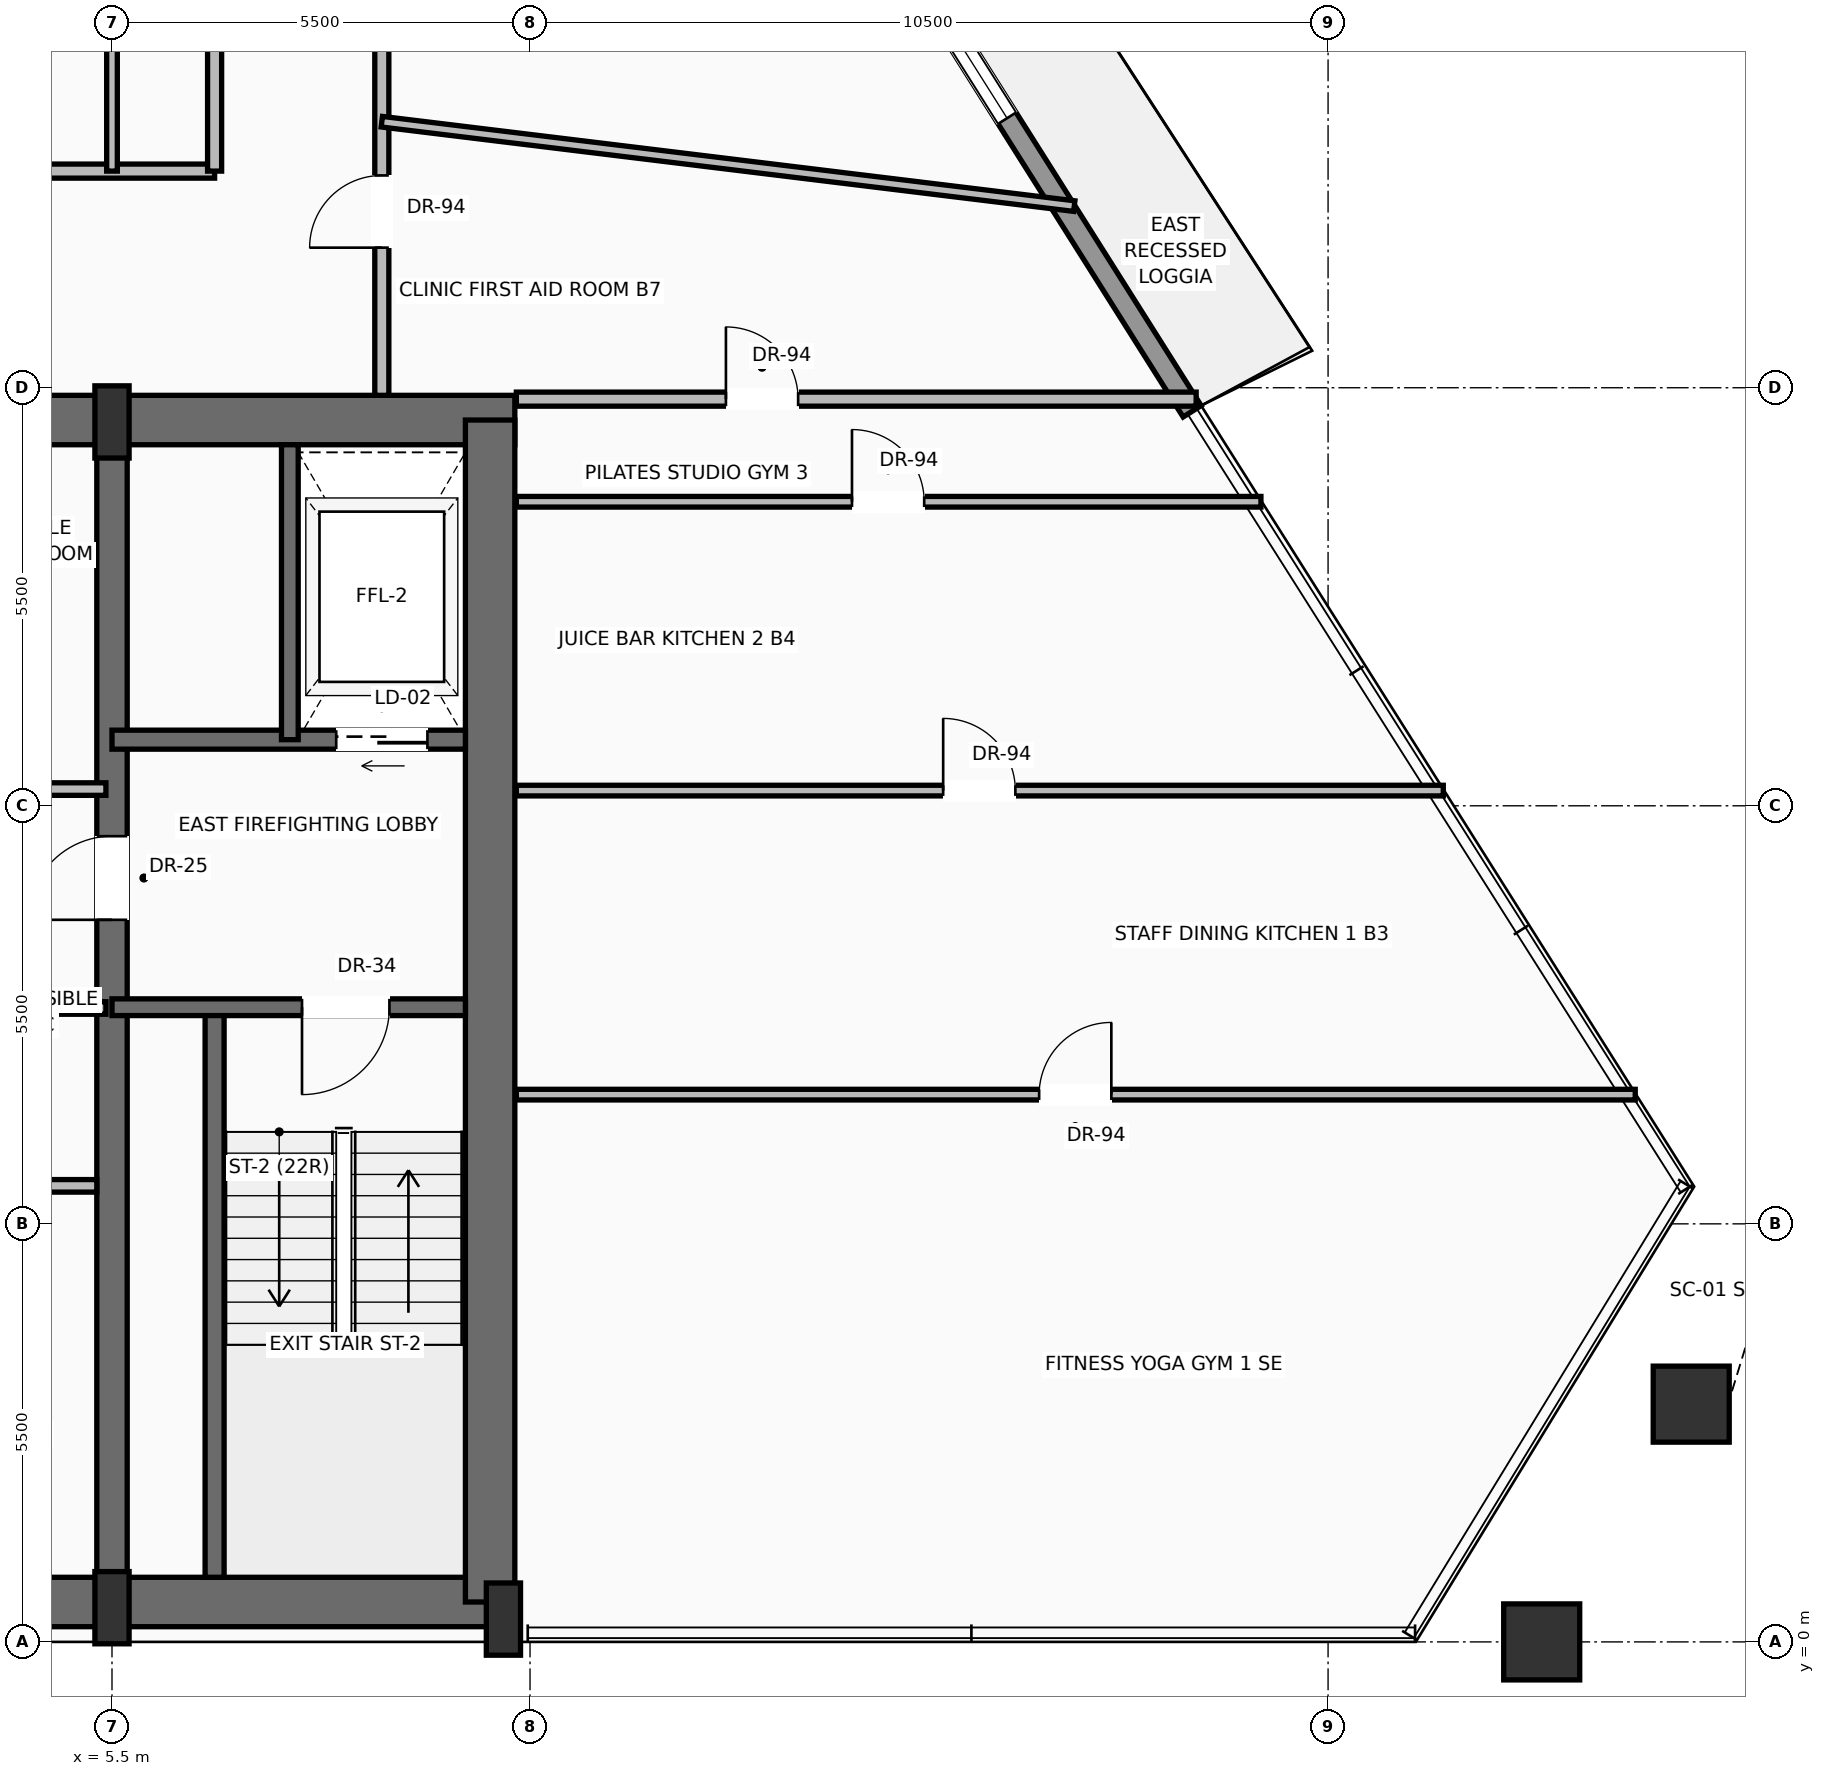
"""IFC4 building model, lengths in metres.
Left out: names, types, materials, properties, quantities, classifications, styles, units other than length and angle.
Written with IfcOpenShell. Run it as: python <this file> out.ifc"""

import sys

from ifc_helpers import new_model, si_unit, direction, frame, frame_2d, origin, origin_2d, place, context, subcontext, project, spatial, rectangle, hollow_rectangle, extrude, source, transform, mapped, element, fill, save


model = new_model("IFC4")
c1 = context("Model", 3, precision=1e-05, world=origin(), true_north=direction((0.0, 1.0)))
c2 = subcontext(c1, "Body", "Model", "MODEL_VIEW")
j1 = project(units=[si_unit("LENGTHUNIT", "METRE"), si_unit("PLANEANGLEUNIT", "RADIAN")], contexts=[c1])
p1 = place(None, origin())
s1 = spatial("IfcSite", under=j1, at=p1, CompositionType="ELEMENT")
p2 = place(p1, origin())
s2 = spatial("IfcBuilding", under=s1, at=p2, CompositionType="ELEMENT")
p3 = place(p2, frame((0.0, 0.0, 200.6)))
s3 = spatial("IfcBuildingStorey", under=s2, at=p3, CompositionType="ELEMENT", Elevation=200.6)
p4 = place(p3, frame((-10.65, 0.525, 0.0), z_axis=(0.0, 0.0, 1.0), x_axis=(1.0, 0.0, 0.0)))
e1 = element("IfcWall", 1, at=p4, inside=s3, PredefinedType="SHEAR", context=c2, shape_type="SweptSolid", body=[
    extrude(rectangle(XDim=21.3, YDim=0.65, at=frame_2d((10.65, 0.0))), origin(), (0.0, 0.0, 1.0), 3.47),
])
p5 = place(p3, frame((-10.8, 16.075, 0.0), z_axis=(0.0, 0.0, 1.0), x_axis=(1.0, 0.0, 0.0)))
e2 = element("IfcWall", 2, at=p5, inside=s3, PredefinedType="SHEAR", context=c2, shape_type="SweptSolid", body=[
    extrude(rectangle(XDim=21.6, YDim=0.65, at=frame_2d((10.8, 0.0))), origin(), (0.0, 0.0, 1.0), 3.47),
])
p6 = place(p5, frame((3.37, 0.0, 0.0)))
e3 = element("IfcOpeningElement", 3, at=p6, cuts=e2, PredefinedType="OPENING", context=c2, shape_type="SweptSolid", body=[
    extrude(rectangle(XDim=1.3, YDim=2.3, at=frame_2d((0.65, 1.15))), frame((0.0, 0.335, 0.0), z_axis=(0.0, -1.0, 0.0), x_axis=(1.0, 0.0, 0.0)), (0.0, 0.0, 1.0), 0.67),
])
p7 = place(p5, frame((9.8, 0.0, 0.0)))
e4 = element("IfcOpeningElement", 4, at=p7, cuts=e2, PredefinedType="OPENING", context=c2, shape_type="SweptSolid", body=[
    extrude(rectangle(XDim=2.0, YDim=2.4, at=frame_2d((1.0, 1.2))), frame((0.0, 0.335, 0.0), z_axis=(0.0, -1.0, 0.0), x_axis=(1.0, 0.0, 0.0)), (0.0, 0.0, 1.0), 0.67),
])
p8 = place(p3, frame((10.475, 0.525, 0.0), z_axis=(0.0, 0.0, 1.0), x_axis=(0.0, 1.0, 0.0)))
e5 = element("IfcWall", 5, at=p8, inside=s3, PredefinedType="SHEAR", context=c2, shape_type="SweptSolid", body=[
    extrude(rectangle(XDim=15.55, YDim=0.65, at=frame_2d((7.775, 0.0))), origin(), (0.0, 0.0, 1.0), 3.47),
])
p9 = place(p3, frame((5.5, 0.525, 0.0), z_axis=(0.0, 0.0, 1.0), x_axis=(0.0, 1.0, 0.0)))
e6 = element("IfcWall", 6, at=p9, inside=s3, PredefinedType="SHEAR", context=c2, shape_type="SweptSolid", body=[
    extrude(rectangle(XDim=15.55, YDim=0.4, at=frame_2d((7.775, 0.0))), origin(), (0.0, 0.0, 1.0), 3.47),
])
p10 = place(p9, frame((8.975, 0.0, 0.0)))
e7 = element("IfcOpeningElement", 7, at=p10, cuts=e6, PredefinedType="OPENING", context=c2, shape_type="SweptSolid", body=[
    extrude(rectangle(XDim=1.1, YDim=2.2, at=frame_2d((0.55, 1.1))), frame((0.0, 0.21, 0.0), z_axis=(0.0, -1.0, 0.0), x_axis=(1.0, 0.0, 0.0)), (0.0, 0.0, 1.0), 0.42),
])
m1 = source(origin(), c2, "Body", "SweptSolid", [
    extrude(rectangle(XDim=0.45, YDim=0.95, at=origin_2d()), origin(), (0.0, 0.0, 1.0), 3.7),
])
for number, where, z_axis, x_axis in (
    (8, (5.5, 0.45, 0.0), (0.0, 0.0, 1.0), (1.0, 0.0, 0.0)),
    (9, (10.65, 0.3, 0.0), (0.0, 0.0, 1.0), (1.0, 0.0, 0.0)),
    (10, (5.5, 16.05, 0.0), (0.0, 0.0, 1.0), (1.0, 0.0, 0.0)),
):
    element("IfcColumn", number, at=place(p3, frame(where, z_axis=z_axis, x_axis=x_axis)), inside=s3, PredefinedType="PILASTER", context=c2, shape_type="MappedRepresentation", body=[
        mapped(m1, transform((0.0, 0.0, 0.0), scale=1.0)),
    ])
m2 = source(origin(), c2, "Body", "SweptSolid", [
    extrude(hollow_rectangle(XDim=1.0, YDim=1.0, WallThickness=0.05, at=origin_2d()), origin(), (0.0, 0.0, 1.0), 3.691),
])
p11 = place(p3, frame((24.311, 0.0, 0.004), z_axis=(0.004233046273, 0.0, 0.999991040619), x_axis=(0.0, 1.0, 0.0)))
e11 = element("IfcColumn", 11, at=p11, inside=s3, PredefinedType="COLUMN", context=c2, shape_type="MappedRepresentation", body=[
    mapped(m2, transform((0.0, 0.0, 0.0), scale=1.0)),
])
m3 = source(origin(), c2, "Body", "SweptSolid", [
    extrude(hollow_rectangle(XDim=1.0, YDim=1.0, WallThickness=0.05, at=origin_2d()), origin(), (0.0, 0.0, 1.0), 3.692),
])
p12 = place(p3, frame((26.278, 3.128, 0.004), z_axis=(-0.006481100348, -0.014417141591, 0.999875062879), x_axis=(0.912078006771, -0.41001671864, 0.0)))
e12 = element("IfcColumn", 12, at=p12, inside=s3, PredefinedType="COLUMN", context=c2, shape_type="MappedRepresentation", body=[
    mapped(m3, transform((0.0, 0.0, 0.0), scale=1.0)),
])
p13 = place(p3, frame((9.517, 32.336, 0.0), z_axis=(0.0, 0.0, 1.0), x_axis=(0.533881383678, -0.845559381807, 0.0)))
e13 = element("IfcWall", 13, at=p13, inside=s3, PredefinedType="SOLIDWALL", context=c2, shape_type="SweptSolid", body=[
    extrude(rectangle(XDim=19.095, YDim=0.28, at=frame_2d((9.547, 0.0))), origin(), (0.0, 0.0, 1.0), 3.05),
])
p14 = place(p13, frame((4.583, 0.0, 0.0)))
e14 = element("IfcOpeningElement", 14, at=p14, cuts=e13, PredefinedType="OPENING", context=c2, shape_type="SweptSolid", body=[
    extrude(rectangle(XDim=1.6, YDim=2.35, at=frame_2d((0.8, 1.175))), frame((0.0, 0.15, 0.0), z_axis=(0.0, -1.0, 0.0), x_axis=(1.0, 0.0, 0.0)), (0.0, 0.0, 1.0), 0.3),
])
p15 = place(p13, frame((12.985, 0.0, 0.9)))
e15 = element("IfcOpeningElement", 15, at=p15, cuts=e13, PredefinedType="OPENING", context=c2, shape_type="SweptSolid", body=[
    extrude(rectangle(XDim=1.55, YDim=1.85, at=frame_2d((0.775, 0.925))), frame((0.0, 0.15, 0.0), z_axis=(0.0, -1.0, 0.0), x_axis=(1.0, 0.0, 0.0)), (0.0, 0.0, 1.0), 0.3),
])
p16 = place(p3, frame((6.85, 0.85, 0.0), z_axis=(0.0, 0.0, 1.0), x_axis=(0.0, 1.0, 0.0)))
e16 = element("IfcWall", 16, at=p16, inside=s3, PredefinedType="SOLIDWALL", context=c2, shape_type="SweptSolid", body=[
    extrude(rectangle(XDim=7.5, YDim=0.25, at=frame_2d((3.75, 0.0))), origin(), (0.0, 0.0, 1.0), 3.47),
])
p17 = place(p3, frame((10.15, 8.35, 0.0), z_axis=(0.0, 0.0, 1.0), x_axis=(-1.0, 0.0, 0.0)))
e17 = element("IfcWall", 17, at=p17, inside=s3, PredefinedType="SOLIDWALL", context=c2, shape_type="SweptSolid", body=[
    extrude(rectangle(XDim=4.65, YDim=0.22, at=frame_2d((2.325, 0.0))), origin(), (0.0, 0.0, 1.0), 3.47),
])
p18 = place(p17, frame((1.0, 0.0, 0.0)))
e18 = element("IfcOpeningElement", 18, at=p18, cuts=e17, PredefinedType="OPENING", context=c2, shape_type="SweptSolid", body=[
    extrude(rectangle(XDim=1.15, YDim=2.2, at=frame_2d((0.575, 1.1))), frame((0.0, 0.12, 0.0), z_axis=(0.0, -1.0, 0.0), x_axis=(1.0, 0.0, 0.0)), (0.0, 0.0, 1.0), 0.24),
])
p19 = place(p3, frame((10.15, 11.87, 0.0), z_axis=(0.0, 0.0, 1.0), x_axis=(-1.0, 0.0, 0.0)))
e19 = element("IfcWall", 19, at=p19, inside=s3, PredefinedType="SOLIDWALL", context=c2, shape_type="SweptSolid", body=[
    extrude(rectangle(XDim=4.65, YDim=0.25, at=frame_2d((2.325, 0.0))), origin(), (0.0, 0.0, 1.0), 3.47),
])
p20 = place(p19, frame((0.5, 0.0, 0.0)))
e20 = element("IfcOpeningElement", 20, at=p20, cuts=e19, PredefinedType="OPENING", context=c2, shape_type="SweptSolid", body=[
    extrude(rectangle(XDim=1.2, YDim=2.25, at=frame_2d((0.6, 1.125))), frame((0.0, 0.135, 0.0), z_axis=(0.0, -1.0, 0.0), x_axis=(1.0, 0.0, 0.0)), (0.0, 0.0, 1.0), 0.27),
])
p21 = place(p3, frame((7.84, 11.87, 0.0), z_axis=(0.0, 0.0, 1.0), x_axis=(0.0, 1.0, 0.0)))
e21 = element("IfcWall", 21, at=p21, inside=s3, PredefinedType="SOLIDWALL", context=c2, shape_type="SweptSolid", body=[
    extrude(rectangle(XDim=3.88, YDim=0.22, at=frame_2d((1.94, 0.0))), origin(), (0.0, 0.0, 1.0), 3.47),
])
p22 = place(p3, frame((1.82, 6.0, 0.0), z_axis=(0.0, 0.0, 1.0), x_axis=(1.0, 0.0, 0.0)))
e22 = element("IfcWall", 22, at=p22, inside=s3, PredefinedType="PARTITIONING", context=c2, shape_type="SweptSolid", body=[
    extrude(rectangle(XDim=3.48, YDim=0.165, at=frame_2d((1.74, 0.0))), origin(), (0.0, 0.0, 1.0), 3.462),
])
p23 = place(p22, frame((0.38, 0.0, 0.0)))
e23 = element("IfcOpeningElement", 23, at=p23, cuts=e22, PredefinedType="OPENING", context=c2, shape_type="SweptSolid", body=[
    extrude(rectangle(XDim=0.9, YDim=2.1, at=frame_2d((0.45, 1.05))), frame((0.0, 0.093, 0.0), z_axis=(0.0, -1.0, 0.0), x_axis=(1.0, 0.0, 0.0)), (0.0, 0.0, 1.0), 0.185),
])
for number, where, z_axis, x_axis in (
    (24, (3.54, 8.34, 0.0), (0.0, 0.0, 1.0), (1.0, 0.0, 0.0)),
    (25, (3.54, 11.22, 0.0), (0.0, 0.0, 1.0), (1.0, 0.0, 0.0)),
):
    element("IfcWall", number, at=place(p3, frame(where, z_axis=z_axis, x_axis=x_axis)), inside=s3, PredefinedType="PARTITIONING", context=c2, shape_type="SweptSolid", body=[
        extrude(rectangle(XDim=1.88, YDim=0.165, at=frame_2d((0.94, 0.0))), origin(), (0.0, 0.0, 1.0), 3.462),
    ])
p24 = place(p3, frame((-7.35, 19.35, 0.0), z_axis=(0.0, 0.0, 1.0), x_axis=(1.0, 0.0, 0.0)))
e26 = element("IfcWall", 26, at=p24, inside=s3, PredefinedType="PARTITIONING", context=c2, shape_type="SweptSolid", body=[
    extrude(rectangle(XDim=14.2, YDim=0.185, at=frame_2d((7.1, 0.0))), origin(), (0.0, 0.0, 1.0), 2.846),
])
p25 = place(p24, frame((6.625, 0.0, 0.0)))
e27 = element("IfcOpeningElement", 27, at=p25, cuts=e26, PredefinedType="OPENING", context=c2, shape_type="SweptSolid", body=[
    extrude(rectangle(XDim=0.95, YDim=2.2, at=frame_2d((0.475, 1.1))), frame((0.0, 0.103, 0.0), z_axis=(0.0, -1.0, 0.0), x_axis=(1.0, 0.0, 0.0)), (0.0, 0.0, 1.0), 0.205),
])
p26 = place(p3, frame((6.85, 19.35, 0.0), z_axis=(0.0, 0.0, 1.0), x_axis=(0.0, 1.0, 0.0)))
e28 = element("IfcWall", 28, at=p26, inside=s3, PredefinedType="PARTITIONING", context=c2, shape_type="SweptSolid", body=[
    extrude(rectangle(XDim=2.85, YDim=0.185, at=frame_2d((1.425, 0.0))), origin(), (0.0, 0.0, 1.0), 3.462),
])
p27 = place(p3, frame((9.05, 16.4, 0.0), z_axis=(0.0, 0.0, 1.0), x_axis=(0.0, 1.0, 0.0)))
e29 = element("IfcWall", 29, at=p27, inside=s3, PredefinedType="PARTITIONING", context=c2, shape_type="SweptSolid", body=[
    extrude(rectangle(XDim=5.8, YDim=0.185, at=frame_2d((2.9, 0.0))), origin(), (0.0, 0.0, 1.0), 3.462),
])
p28 = place(p27, frame((1.943, 0.0, 0.0)))
e30 = element("IfcOpeningElement", 30, at=p28, cuts=e29, PredefinedType="OPENING", context=c2, shape_type="SweptSolid", body=[
    extrude(rectangle(XDim=0.95, YDim=2.2, at=frame_2d((0.475, 1.1))), frame((0.0, 0.103, 0.0), z_axis=(0.0, -1.0, 0.0), x_axis=(1.0, 0.0, 0.0)), (0.0, 0.0, 1.0), 0.205),
])
p29 = place(p3, frame((10.82, 16.35, 0.0), z_axis=(0.0, 0.0, 1.0), x_axis=(1.0, 0.0, 0.0)))
e31 = element("IfcWall", 31, at=p29, inside=s3, PredefinedType="PARTITIONING", context=c2, shape_type="SweptSolid", body=[
    extrude(rectangle(XDim=8.944, YDim=0.185, at=frame_2d((4.472, 0.0))), origin(), (0.0, 0.0, 1.0), 3.462),
])
p30 = place(p29, frame((2.758, 0.0, 0.0)))
e32 = element("IfcOpeningElement", 32, at=p30, cuts=e31, PredefinedType="OPENING", context=c2, shape_type="SweptSolid", body=[
    extrude(rectangle(XDim=0.95, YDim=2.2, at=frame_2d((0.475, 1.1))), frame((0.0, 0.103, 0.0), z_axis=(0.0, -1.0, 0.0), x_axis=(1.0, 0.0, 0.0)), (0.0, 0.0, 1.0), 0.205),
])
p31 = place(p3, frame((5.5, 19.35, 0.0), z_axis=(0.0, 0.0, 1.0), x_axis=(0.0, 1.0, 0.0)))
e33 = element("IfcWall", 33, at=p31, inside=s3, PredefinedType="PARTITIONING", context=c2, shape_type="SweptSolid", body=[
    extrude(rectangle(XDim=13.15, YDim=0.14, at=frame_2d((6.575, 0.0))), origin(), (0.0, 0.0, 1.0), 2.846),
])
p32 = place(p3, frame((10.82, 7.2, 0.0), z_axis=(0.0, 0.0, 1.0), x_axis=(1.0, 0.0, 0.0)))
e34 = element("IfcWall", 34, at=p32, inside=s3, PredefinedType="PARTITIONING", context=c2, shape_type="SweptSolid", body=[
    extrude(rectangle(XDim=14.721, YDim=0.14, at=frame_2d((7.361, 0.0))), origin(), (0.0, 0.0, 1.0), 3.049),
])
p33 = place(p32, frame((6.878, 0.0, 0.0)))
e35 = element("IfcOpeningElement", 35, at=p33, cuts=e34, PredefinedType="OPENING", context=c2, shape_type="SweptSolid", body=[
    extrude(rectangle(XDim=0.95, YDim=2.2, at=frame_2d((0.475, 1.1))), frame((0.0, 0.08, 0.0), z_axis=(0.0, -1.0, 0.0), x_axis=(1.0, 0.0, 0.0)), (0.0, 0.0, 1.0), 0.16),
])
p34 = place(p3, frame((10.82, 11.2, 0.0), z_axis=(0.0, 0.0, 1.0), x_axis=(1.0, 0.0, 0.0)))
e36 = element("IfcWall", 36, at=p34, inside=s3, PredefinedType="PARTITIONING", context=c2, shape_type="SweptSolid", body=[
    extrude(rectangle(XDim=12.196, YDim=0.14, at=frame_2d((6.098, 0.0))), origin(), (0.0, 0.0, 1.0), 3.462),
])
p35 = place(p34, frame((5.616, 0.0, 0.0)))
e37 = element("IfcOpeningElement", 37, at=p35, cuts=e36, PredefinedType="OPENING", context=c2, shape_type="SweptSolid", body=[
    extrude(rectangle(XDim=0.95, YDim=2.2, at=frame_2d((0.475, 1.1))), frame((0.0, 0.08, 0.0), z_axis=(0.0, -1.0, 0.0), x_axis=(1.0, 0.0, 0.0)), (0.0, 0.0, 1.0), 0.16),
])
p36 = place(p3, frame((10.82, 15.0, 0.0), z_axis=(0.0, 0.0, 1.0), x_axis=(1.0, 0.0, 0.0)))
e38 = element("IfcWall", 38, at=p36, inside=s3, PredefinedType="PARTITIONING", context=c2, shape_type="SweptSolid", body=[
    extrude(rectangle(XDim=9.797, YDim=0.14, at=frame_2d((4.898, 0.0))), origin(), (0.0, 0.0, 1.0), 3.462),
])
p37 = place(p36, frame((4.416, 0.0, 0.0)))
e39 = element("IfcOpeningElement", 39, at=p37, cuts=e38, PredefinedType="OPENING", context=c2, shape_type="SweptSolid", body=[
    extrude(rectangle(XDim=0.95, YDim=2.2, at=frame_2d((0.475, 1.1))), frame((0.0, 0.08, 0.0), z_axis=(0.0, -1.0, 0.0), x_axis=(1.0, 0.0, 0.0)), (0.0, 0.0, 1.0), 0.16),
])
p38 = place(p3, frame((9.05, 20.0, 0.0), z_axis=(0.0, 0.0, 1.0), x_axis=(0.992652190929, -0.121002594366, 0.0)))
e40 = element("IfcWall", 40, at=p38, inside=s3, PredefinedType="PARTITIONING", context=c2, shape_type="SweptSolid", body=[
    extrude(rectangle(XDim=9.178, YDim=0.14, at=frame_2d((4.589, 0.0))), origin(), (0.0, 0.0, 1.0), 3.049),
])
m4 = source(origin(), c2, "Body", "SweptSolid", [
    extrude(rectangle(XDim=1.55, YDim=1.85, at=frame_2d((0.775, 0.925))), frame((0.0, 0.03, 0.0), z_axis=(0.0, -1.0, 0.0), x_axis=(1.0, 0.0, 0.0)), (0.0, 0.0, 1.0), 0.06),
])
p39 = place(p15, origin())
e41 = element("IfcWindow", 41, at=p39, inside=s3, PartitioningType="SINGLE_PANEL", PredefinedType="WINDOW", context=c2, shape_type="MappedRepresentation", body=[
    mapped(m4, transform((0.0, 0.0, 0.0), scale=1.0)),
])
fill(e15, e41)
m5 = source(origin(), c2, "Body", "SweptSolid", [
    extrude(rectangle(XDim=1.15, YDim=2.2, at=frame_2d((0.575, 1.1))), frame((0.0, 0.025, 0.0), z_axis=(0.0, -1.0, 0.0), x_axis=(1.0, 0.0, 0.0)), (0.0, 0.0, 1.0), 0.05),
])
p40 = place(p18, origin())
e42 = element("IfcDoor", 42, at=p40, inside=s3, OperationType="SINGLE_SWING_RIGHT", PredefinedType="DOOR", context=c2, shape_type="MappedRepresentation", body=[
    mapped(m5, transform((0.0, 0.0, 0.0), scale=1.0)),
])
fill(e18, e42)
m6 = source(origin(), c2, "Body", "SweptSolid", [
    extrude(rectangle(XDim=1.1, YDim=2.2, at=frame_2d((0.55, 1.1))), frame((0.0, 0.025, 0.0), z_axis=(0.0, -1.0, 0.0), x_axis=(1.0, 0.0, 0.0)), (0.0, 0.0, 1.0), 0.05),
])
p41 = place(p10, origin())
e43 = element("IfcDoor", 43, at=p41, inside=s3, OperationType="SINGLE_SWING_LEFT", PredefinedType="DOOR", context=c2, shape_type="MappedRepresentation", body=[
    mapped(m6, transform((0.0, 0.0, 0.0), scale=1.0)),
])
fill(e7, e43)
m7 = source(origin(), c2, "Body", "SweptSolid", [
    extrude(rectangle(XDim=1.2, YDim=2.25, at=frame_2d((0.6, 1.125))), frame((0.0, 0.025, 0.0), z_axis=(0.0, -1.0, 0.0), x_axis=(1.0, 0.0, 0.0)), (0.0, 0.0, 1.0), 0.05),
])
p42 = place(p20, origin())
e44 = element("IfcDoor", 44, at=p42, inside=s3, OperationType="SLIDING_TO_RIGHT", PredefinedType="DOOR", context=c2, shape_type="MappedRepresentation", body=[
    mapped(m7, transform((0.0, 0.0, 0.0), scale=1.0)),
])
fill(e20, e44)
m8 = source(origin(), c2, "Body", "SweptSolid", [
    extrude(rectangle(XDim=0.95, YDim=2.2, at=frame_2d((0.475, 1.1))), frame((0.0, 0.025, 0.0), z_axis=(0.0, -1.0, 0.0), x_axis=(1.0, 0.0, 0.0)), (0.0, 0.0, 1.0), 0.05),
])
p43 = place(p28, origin())
e45 = element("IfcDoor", 45, at=p43, inside=s3, OperationType="SINGLE_SWING_LEFT", PredefinedType="DOOR", context=c2, shape_type="MappedRepresentation", body=[
    mapped(m8, transform((0.0, 0.0, 0.0), scale=1.0)),
])
fill(e30, e45)
p44 = place(p30, origin())
e46 = element("IfcDoor", 46, at=p44, inside=s3, OperationType="SINGLE_SWING_LEFT", PredefinedType="DOOR", context=c2, shape_type="MappedRepresentation", body=[
    mapped(m8, transform((0.0, 0.0, 0.0), scale=1.0)),
])
fill(e32, e46)
p45 = place(p37, origin())
e47 = element("IfcDoor", 47, at=p45, inside=s3, OperationType="SINGLE_SWING_LEFT", PredefinedType="DOOR", context=c2, shape_type="MappedRepresentation", body=[
    mapped(m8, transform((0.0, 0.0, 0.0), scale=1.0)),
])
fill(e39, e47)
p46 = place(p35, origin())
e48 = element("IfcDoor", 48, at=p46, inside=s3, OperationType="SINGLE_SWING_LEFT", PredefinedType="DOOR", context=c2, shape_type="MappedRepresentation", body=[
    mapped(m8, transform((0.0, 0.0, 0.0), scale=1.0)),
])
fill(e37, e48)
p47 = place(p33, origin())
e49 = element("IfcDoor", 49, at=p47, inside=s3, OperationType="SINGLE_SWING_RIGHT", PredefinedType="DOOR", context=c2, shape_type="MappedRepresentation", body=[
    mapped(m8, transform((0.0, 0.0, 0.0), scale=1.0)),
])
fill(e35, e49)
save(model, sys.argv[1])
